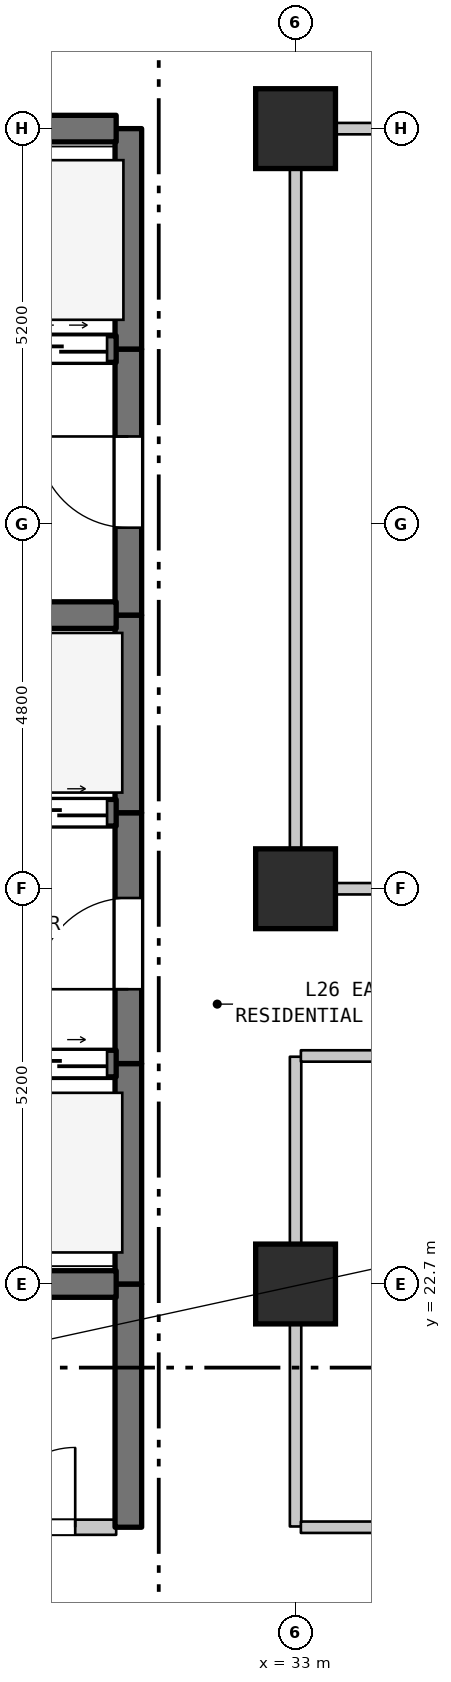
"""IFC4 building model, lengths in metres.
Left out: names, types, materials, properties, quantities, classifications, styles, units other than length and angle.
Written with IfcOpenShell. Run it as: python <this file> out.ifc"""

import sys

from ifc_helpers import new_model, si_unit, direction, frame, frame_2d, origin, origin_2d, place, context, subcontext, project, spatial, rectangle, extrude, element, fill, save


model = new_model("IFC4")
c1 = context("Model", 3, precision=1e-05, world=origin(), true_north=direction((0.0, 1.0)))
c2 = subcontext(c1, "Body", "Model", "MODEL_VIEW")
j1 = project(units=[si_unit("LENGTHUNIT", "METRE"), si_unit("PLANEANGLEUNIT", "RADIAN")], contexts=[c1])
p1 = place(None, origin())
s1 = spatial("IfcSite", under=j1, at=p1, CompositionType="ELEMENT")
p2 = place(p1, origin())
s2 = spatial("IfcBuilding", under=s1, at=p2, CompositionType="ELEMENT")
p3 = place(p2, frame((0.0, 0.0, 109.4)))
s3 = spatial("IfcBuildingStorey", under=s2, at=p3, CompositionType="ELEMENT", Elevation=109.4)
for number, where, z_axis, x_axis in (
    (1, (33.0, 22.7, 0.0), (0.0, 0.0, 1.0), (1.0, 0.0, 0.0)),
    (2, (33.0, 27.9, 0.0), (0.0, 0.0, 1.0), (1.0, 0.0, 0.0)),
    (3, (33.0, 37.9, 0.0), (0.0, 0.0, 1.0), (1.0, 0.0, 0.0)),
):
    element("IfcColumn", number, at=place(p3, frame(where, z_axis=z_axis, x_axis=x_axis)), inside=s3, PredefinedType="COLUMN", context=c2, shape_type="SweptSolid", body=[
        extrude(rectangle(XDim=1.05, YDim=1.05, at=origin_2d()), origin(), (0.0, 0.0, 1.0), 3.7),
    ])
p4 = place(p3, frame((30.8, 19.5, 0.0), z_axis=(0.0, 0.0, 1.0), x_axis=(0.0, 1.0, 0.0)))
e4 = element("IfcWall", 4, at=p4, inside=s3, PredefinedType="SHEAR", context=c2, shape_type="SweptSolid", body=[
    extrude(rectangle(XDim=3.2, YDim=0.35, at=frame_2d((1.6, 0.0))), origin(), (0.0, 0.0, 1.0), 3.385),
])
p5 = place(p3, frame((30.8, 22.7, 0.0), z_axis=(0.0, 0.0, 1.0), x_axis=(0.0, 1.0, 0.0)))
e5 = element("IfcWall", 5, at=p5, inside=s3, PredefinedType="SHEAR", context=c2, shape_type="SweptSolid", body=[
    extrude(rectangle(XDim=2.9, YDim=0.35, at=frame_2d((1.45, 0.0))), origin(), (0.0, 0.0, 1.0), 3.385),
])
p6 = place(p3, frame((30.8, 25.6, 0.0), z_axis=(0.0, 0.0, 1.0), x_axis=(0.0, 1.0, 0.0)))
e6 = element("IfcWall", 6, at=p6, inside=s3, PredefinedType="SHEAR", context=c2, shape_type="SweptSolid", body=[
    extrude(rectangle(XDim=3.3, YDim=0.35, at=frame_2d((1.65, 0.0))), origin(), (0.0, 0.0, 1.0), 3.385),
])
p7 = place(p6, frame((0.978, 0.0, 0.0)))
e7 = element("IfcOpeningElement", 7, at=p7, cuts=e6, PredefinedType="OPENING", context=c2, shape_type="SweptSolid", body=[
    extrude(rectangle(XDim=1.2, YDim=2.2, at=frame_2d((0.6, 1.1))), frame((0.0, 0.185, 0.0), z_axis=(0.0, -1.0, 0.0), x_axis=(1.0, 0.0, 0.0)), (0.0, 0.0, 1.0), 0.37),
])
p8 = place(p3, frame((30.8, 28.9, 0.0), z_axis=(0.0, 0.0, 1.0), x_axis=(0.0, 1.0, 0.0)))
e8 = element("IfcWall", 8, at=p8, inside=s3, PredefinedType="SHEAR", context=c2, shape_type="SweptSolid", body=[
    extrude(rectangle(XDim=2.6, YDim=0.35, at=frame_2d((1.3, 0.0))), origin(), (0.0, 0.0, 1.0), 3.385),
])
p9 = place(p3, frame((30.8, 31.5, 0.0), z_axis=(0.0, 0.0, 1.0), x_axis=(0.0, 1.0, 0.0)))
e9 = element("IfcWall", 9, at=p9, inside=s3, PredefinedType="SHEAR", context=c2, shape_type="SweptSolid", body=[
    extrude(rectangle(XDim=3.5, YDim=0.35, at=frame_2d((1.75, 0.0))), origin(), (0.0, 0.0, 1.0), 3.385),
])
p10 = place(p9, frame((1.15, 0.0, 0.0)))
e10 = element("IfcOpeningElement", 10, at=p10, cuts=e9, PredefinedType="OPENING", context=c2, shape_type="SweptSolid", body=[
    extrude(rectangle(XDim=1.2, YDim=2.2, at=frame_2d((0.6, 1.1))), frame((0.0, 0.185, 0.0), z_axis=(0.0, -1.0, 0.0), x_axis=(1.0, 0.0, 0.0)), (0.0, 0.0, 1.0), 0.37),
])
p11 = place(p3, frame((30.8, 35.0, 0.0), z_axis=(0.0, 0.0, 1.0), x_axis=(0.0, 1.0, 0.0)))
e11 = element("IfcWall", 11, at=p11, inside=s3, PredefinedType="SHEAR", context=c2, shape_type="SweptSolid", body=[
    extrude(rectangle(XDim=2.9, YDim=0.35, at=frame_2d((1.45, 0.0))), origin(), (0.0, 0.0, 1.0), 3.385),
])
p12 = place(p3, frame((33.0, 19.51, 0.0), z_axis=(0.0, 0.0, 1.0), x_axis=(0.0, 1.0, 0.0)))
e12 = element("IfcWall", 12, at=p12, inside=s3, PredefinedType="STANDARD", context=c2, shape_type="SweptSolid", body=[
    extrude(rectangle(XDim=6.18, YDim=0.15, at=frame_2d((3.09, 0.0))), origin(), (0.0, 0.0, 1.0), 2.935),
])
p13 = place(p3, frame((33.0, 27.91, 0.0), z_axis=(0.0, 0.0, 1.0), x_axis=(0.0, 1.0, 0.0)))
e13 = element("IfcWall", 13, at=p13, inside=s3, PredefinedType="STANDARD", context=c2, shape_type="SweptSolid", body=[
    extrude(rectangle(XDim=9.98, YDim=0.15, at=frame_2d((4.99, 0.0))), origin(), (0.0, 0.0, 1.0), 2.885),
])
p14 = place(p3, frame((28.585, 19.5, 0.0), z_axis=(0.0, 0.0, 1.0), x_axis=(1.0, 0.0, 0.0)))
e14 = element("IfcWall", 14, at=p14, inside=s3, PredefinedType="STANDARD", context=c2, shape_type="SweptSolid", body=[
    extrude(rectangle(XDim=2.055, YDim=0.2, at=frame_2d((1.027, 0.0))), origin(), (0.0, 0.0, 1.0), 3.385),
])
p15 = place(p14, frame((0.466, 0.0, 0.0)))
e15 = element("IfcOpeningElement", 15, at=p15, cuts=e14, PredefinedType="OPENING", context=c2, shape_type="SweptSolid", body=[
    extrude(rectangle(XDim=1.05, YDim=2.15, at=frame_2d((0.525, 1.075))), frame((0.0, 0.11, 0.0), z_axis=(0.0, -1.0, 0.0), x_axis=(1.0, 0.0, 0.0)), (0.0, 0.0, 1.0), 0.22),
])
p16 = place(p3, frame((33.07, 19.5, 0.0), z_axis=(0.0, 0.0, 1.0), x_axis=(1.0, 0.0, 0.0)))
e16 = element("IfcWall", 16, at=p16, inside=s3, PredefinedType="STANDARD", context=c2, shape_type="SweptSolid", body=[
    extrude(rectangle(XDim=21.51, YDim=0.15, at=frame_2d((10.755, 0.0))), origin(), (0.0, 0.0, 1.0), 3.385),
])
p17 = place(p3, frame((28.585, 22.7, 0.0), z_axis=(0.0, 0.0, 1.0), x_axis=(1.0, 0.0, 0.0)))
e17 = element("IfcWall", 17, at=p17, inside=s3, PredefinedType="SHEAR", context=c2, shape_type="SweptSolid", body=[
    extrude(rectangle(XDim=2.055, YDim=0.35, at=frame_2d((1.027, 0.0))), origin(), (0.0, 0.0, 1.0), 3.385),
])
p18 = place(p3, frame((27.46, 25.6, 0.0), z_axis=(0.0, 0.0, 1.0), x_axis=(1.0, 0.0, 0.0)))
e18 = element("IfcWall", 18, at=p18, inside=s3, PredefinedType="SHEAR", context=c2, shape_type="SweptSolid", body=[
    extrude(rectangle(XDim=3.18, YDim=0.35, at=frame_2d((1.59, 0.0))), origin(), (0.0, 0.0, 1.0), 3.385),
])
p19 = place(p18, frame((0.12, 0.0, 0.0)))
e19 = element("IfcOpeningElement", 19, at=p19, cuts=e18, PredefinedType="OPENING", context=c2, shape_type="SweptSolid", body=[
    extrude(rectangle(XDim=1.25, YDim=2.2, at=frame_2d((0.625, 1.1))), frame((0.0, 0.185, 0.0), z_axis=(0.0, -1.0, 0.0), x_axis=(1.0, 0.0, 0.0)), (0.0, 0.0, 1.0), 0.37),
])
p20 = place(p18, frame((1.81, 0.0, 0.0)))
e20 = element("IfcOpeningElement", 20, at=p20, cuts=e18, PredefinedType="OPENING", context=c2, shape_type="SweptSolid", body=[
    extrude(rectangle(XDim=1.25, YDim=2.2, at=frame_2d((0.625, 1.1))), frame((0.0, 0.185, 0.0), z_axis=(0.0, -1.0, 0.0), x_axis=(1.0, 0.0, 0.0)), (0.0, 0.0, 1.0), 0.37),
])
p21 = place(p3, frame((33.07, 25.7, 0.0), z_axis=(0.0, 0.0, 1.0), x_axis=(1.0, 0.0, 0.0)))
e21 = element("IfcWall", 21, at=p21, inside=s3, PredefinedType="STANDARD", context=c2, shape_type="SweptSolid", body=[
    extrude(rectangle(XDim=21.51, YDim=0.15, at=frame_2d((10.755, 0.0))), origin(), (0.0, 0.0, 1.0), 3.385),
])
p22 = place(p3, frame((33.07, 27.9, 0.0), z_axis=(0.0, 0.0, 1.0), x_axis=(1.0, 0.0, 0.0)))
e22 = element("IfcWall", 22, at=p22, inside=s3, PredefinedType="STANDARD", context=c2, shape_type="SweptSolid", body=[
    extrude(rectangle(XDim=11.93, YDim=0.15, at=frame_2d((5.965, 0.0))), origin(), (0.0, 0.0, 1.0), 2.885),
])
p23 = place(p22, frame((10.185, 0.0, 0.0)))
e23 = element("IfcOpeningElement", 23, at=p23, cuts=e22, PredefinedType="OPENING", context=c2, shape_type="SweptSolid", body=[
    extrude(rectangle(XDim=1.0, YDim=2.15, at=frame_2d((0.5, 1.075))), frame((0.0, 0.085, 0.0), z_axis=(0.0, -1.0, 0.0), x_axis=(1.0, 0.0, 0.0)), (0.0, 0.0, 1.0), 0.17),
])
p24 = place(p3, frame((27.46, 28.9, 0.0), z_axis=(0.0, 0.0, 1.0), x_axis=(1.0, 0.0, 0.0)))
e24 = element("IfcWall", 24, at=p24, inside=s3, PredefinedType="SHEAR", context=c2, shape_type="SweptSolid", body=[
    extrude(rectangle(XDim=3.18, YDim=0.35, at=frame_2d((1.59, 0.0))), origin(), (0.0, 0.0, 1.0), 3.385),
])
p25 = place(p24, frame((0.12, 0.0, 0.0)))
e25 = element("IfcOpeningElement", 25, at=p25, cuts=e24, PredefinedType="OPENING", context=c2, shape_type="SweptSolid", body=[
    extrude(rectangle(XDim=1.25, YDim=2.2, at=frame_2d((0.625, 1.1))), frame((0.0, 0.185, 0.0), z_axis=(0.0, -1.0, 0.0), x_axis=(1.0, 0.0, 0.0)), (0.0, 0.0, 1.0), 0.37),
])
p26 = place(p24, frame((1.81, 0.0, 0.0)))
e26 = element("IfcOpeningElement", 26, at=p26, cuts=e24, PredefinedType="OPENING", context=c2, shape_type="SweptSolid", body=[
    extrude(rectangle(XDim=1.25, YDim=2.2, at=frame_2d((0.625, 1.1))), frame((0.0, 0.185, 0.0), z_axis=(0.0, -1.0, 0.0), x_axis=(1.0, 0.0, 0.0)), (0.0, 0.0, 1.0), 0.37),
])
p27 = place(p3, frame((27.46, 31.5, 0.0), z_axis=(0.0, 0.0, 1.0), x_axis=(1.0, 0.0, 0.0)))
e27 = element("IfcWall", 27, at=p27, inside=s3, PredefinedType="SHEAR", context=c2, shape_type="SweptSolid", body=[
    extrude(rectangle(XDim=3.18, YDim=0.35, at=frame_2d((1.59, 0.0))), origin(), (0.0, 0.0, 1.0), 3.385),
])
p28 = place(p3, frame((19.16, 35.0, 0.0), z_axis=(0.0, 0.0, 1.0), x_axis=(1.0, 0.0, 0.0)))
e28 = element("IfcWall", 28, at=p28, inside=s3, PredefinedType="SHEAR", context=c2, shape_type="SweptSolid", body=[
    extrude(rectangle(XDim=11.48, YDim=0.35, at=frame_2d((5.74, 0.0))), origin(), (0.0, 0.0, 1.0), 3.385),
])
p29 = place(p28, frame((0.365, 0.0, 0.0)))
e29 = element("IfcOpeningElement", 29, at=p29, cuts=e28, PredefinedType="OPENING", context=c2, shape_type="SweptSolid", body=[
    extrude(rectangle(XDim=1.35, YDim=2.2, at=frame_2d((0.675, 1.1))), frame((0.0, 0.185, 0.0), z_axis=(0.0, -1.0, 0.0), x_axis=(1.0, 0.0, 0.0)), (0.0, 0.0, 1.0), 0.37),
])
p30 = place(p28, frame((2.765, 0.0, 0.0)))
e30 = element("IfcOpeningElement", 30, at=p30, cuts=e28, PredefinedType="OPENING", context=c2, shape_type="SweptSolid", body=[
    extrude(rectangle(XDim=1.35, YDim=2.2, at=frame_2d((0.675, 1.1))), frame((0.0, 0.185, 0.0), z_axis=(0.0, -1.0, 0.0), x_axis=(1.0, 0.0, 0.0)), (0.0, 0.0, 1.0), 0.37),
])
p31 = place(p28, frame((4.915, 0.0, 0.0)))
e31 = element("IfcOpeningElement", 31, at=p31, cuts=e28, PredefinedType="OPENING", context=c2, shape_type="SweptSolid", body=[
    extrude(rectangle(XDim=1.2, YDim=2.2, at=frame_2d((0.6, 1.1))), frame((0.0, 0.185, 0.0), z_axis=(0.0, -1.0, 0.0), x_axis=(1.0, 0.0, 0.0)), (0.0, 0.0, 1.0), 0.37),
])
p32 = place(p28, frame((6.665, 0.0, 0.0)))
e32 = element("IfcOpeningElement", 32, at=p32, cuts=e28, PredefinedType="OPENING", context=c2, shape_type="SweptSolid", body=[
    extrude(rectangle(XDim=1.2, YDim=2.2, at=frame_2d((0.6, 1.1))), frame((0.0, 0.185, 0.0), z_axis=(0.0, -1.0, 0.0), x_axis=(1.0, 0.0, 0.0)), (0.0, 0.0, 1.0), 0.37),
])
p33 = place(p28, frame((8.415, 0.0, 0.0)))
e33 = element("IfcOpeningElement", 33, at=p33, cuts=e28, PredefinedType="OPENING", context=c2, shape_type="SweptSolid", body=[
    extrude(rectangle(XDim=1.2, YDim=2.2, at=frame_2d((0.6, 1.1))), frame((0.0, 0.185, 0.0), z_axis=(0.0, -1.0, 0.0), x_axis=(1.0, 0.0, 0.0)), (0.0, 0.0, 1.0), 0.37),
])
p34 = place(p28, frame((10.16, 0.0, 0.0)))
e34 = element("IfcOpeningElement", 34, at=p34, cuts=e28, PredefinedType="OPENING", context=c2, shape_type="SweptSolid", body=[
    extrude(rectangle(XDim=1.2, YDim=2.2, at=frame_2d((0.6, 1.1))), frame((0.0, 0.185, 0.0), z_axis=(0.0, -1.0, 0.0), x_axis=(1.0, 0.0, 0.0)), (0.0, 0.0, 1.0), 0.37),
])
p35 = place(p3, frame((19.16, 37.9, 0.0), z_axis=(0.0, 0.0, 1.0), x_axis=(1.0, 0.0, 0.0)))
e35 = element("IfcWall", 35, at=p35, inside=s3, PredefinedType="SHEAR", context=c2, shape_type="SweptSolid", body=[
    extrude(rectangle(XDim=11.48, YDim=0.35, at=frame_2d((5.74, 0.0))), origin(), (0.0, 0.0, 1.0), 3.385),
])
p36 = place(p3, frame((33.07, 37.9, 0.0), z_axis=(0.0, 0.0, 1.0), x_axis=(1.0, 0.0, 0.0)))
e36 = element("IfcWall", 36, at=p36, inside=s3, PredefinedType="STANDARD", context=c2, shape_type="SweptSolid", body=[
    extrude(rectangle(XDim=26.935, YDim=0.15, at=frame_2d((13.467, 0.0))), origin(), (0.0, 0.0, 1.0), 3.385),
])
p37 = place(p36, frame((12.96, 0.0, 0.0)))
e37 = element("IfcOpeningElement", 37, at=p37, cuts=e36, PredefinedType="OPENING", context=c2, shape_type="SweptSolid", body=[
    extrude(rectangle(XDim=1.0, YDim=2.15, at=frame_2d((0.5, 1.075))), frame((0.0, 0.085, 0.0), z_axis=(0.0, -1.0, 0.0), x_axis=(1.0, 0.0, 0.0)), (0.0, 0.0, 1.0), 0.17),
])
p38 = place(p7, origin())
e38 = element("IfcDoor", 38, at=p38, inside=s3, OperationType="SINGLE_SWING_LEFT", PredefinedType="DOOR", context=c2, shape_type="SweptSolid", body=[
    extrude(rectangle(XDim=1.2, YDim=2.2, at=frame_2d((0.6, 1.1))), frame((0.0, 0.025, 0.0), z_axis=(0.0, -1.0, 0.0), x_axis=(1.0, 0.0, 0.0)), (0.0, 0.0, 1.0), 0.05),
])
fill(e7, e38)
p39 = place(p10, origin())
e39 = element("IfcDoor", 39, at=p39, inside=s3, OperationType="SINGLE_SWING_RIGHT", PredefinedType="DOOR", context=c2, shape_type="SweptSolid", body=[
    extrude(rectangle(XDim=1.2, YDim=2.2, at=frame_2d((0.6, 1.1))), frame((0.0, 0.025, 0.0), z_axis=(0.0, -1.0, 0.0), x_axis=(1.0, 0.0, 0.0)), (0.0, 0.0, 1.0), 0.05),
])
fill(e10, e39)
p40 = place(p15, origin())
e40 = element("IfcDoor", 40, at=p40, inside=s3, OperationType="SINGLE_SWING_RIGHT", PredefinedType="DOOR", context=c2, shape_type="SweptSolid", body=[
    extrude(rectangle(XDim=1.05, YDim=2.15, at=frame_2d((0.525, 1.075))), frame((0.0, 0.025, 0.0), z_axis=(0.0, -1.0, 0.0), x_axis=(1.0, 0.0, 0.0)), (0.0, 0.0, 1.0), 0.05),
])
fill(e15, e40)
p41 = place(p20, origin())
e41 = element("IfcDoor", 41, at=p41, inside=s3, OperationType="DOUBLE_DOOR_SLIDING", PredefinedType="DOOR", context=c2, shape_type="SweptSolid", body=[
    extrude(rectangle(XDim=1.25, YDim=2.2, at=frame_2d((0.625, 1.1))), frame((0.0, 0.025, 0.0), z_axis=(0.0, -1.0, 0.0), x_axis=(1.0, 0.0, 0.0)), (0.0, 0.0, 1.0), 0.05),
])
fill(e20, e41)
p42 = place(p26, origin())
e42 = element("IfcDoor", 42, at=p42, inside=s3, OperationType="DOUBLE_DOOR_SLIDING", PredefinedType="DOOR", context=c2, shape_type="SweptSolid", body=[
    extrude(rectangle(XDim=1.25, YDim=2.2, at=frame_2d((0.625, 1.1))), frame((0.0, 0.025, 0.0), z_axis=(0.0, -1.0, 0.0), x_axis=(1.0, 0.0, 0.0)), (0.0, 0.0, 1.0), 0.05),
])
fill(e26, e42)
p43 = place(p34, origin())
e43 = element("IfcDoor", 43, at=p43, inside=s3, OperationType="DOUBLE_DOOR_SLIDING", PredefinedType="DOOR", context=c2, shape_type="SweptSolid", body=[
    extrude(rectangle(XDim=1.2, YDim=2.2, at=frame_2d((0.6, 1.1))), frame((0.0, 0.025, 0.0), z_axis=(0.0, -1.0, 0.0), x_axis=(1.0, 0.0, 0.0)), (0.0, 0.0, 1.0), 0.05),
])
fill(e34, e43)
save(model, sys.argv[1])
